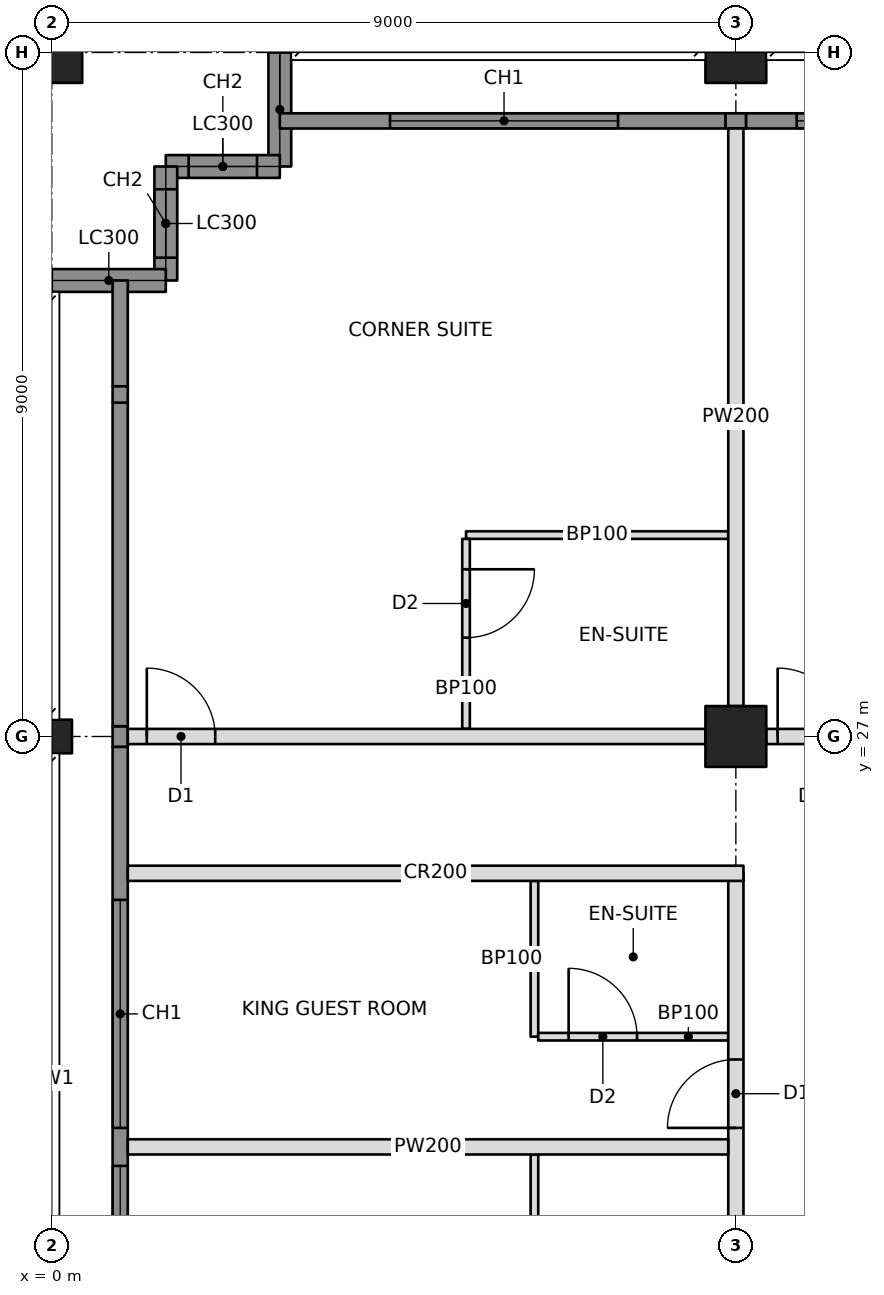
"""IFC4 building model, lengths in metres.
Left out: names, types, materials, properties, quantities, classifications, styles, units other than length and angle.
Written with IfcOpenShell. Run it as: python <this file> out.ifc"""

import sys

from ifc_helpers import new_model, si_unit, direction, frame, frame_2d, origin, origin_2d, place, context, subcontext, project, spatial, rectangle, hollow_rectangle, i_section, extrude, element, fill, save


model = new_model("IFC4")
c1 = context("Model", 3, precision=1e-05, world=origin(), true_north=direction((0.0, 1.0)))
c2 = subcontext(c1, "Body", "Model", "MODEL_VIEW")
j1 = project(units=[si_unit("LENGTHUNIT", "METRE"), si_unit("PLANEANGLEUNIT", "RADIAN")], contexts=[c1])
p1 = place(None, origin())
s1 = spatial("IfcSite", under=j1, at=p1, CompositionType="ELEMENT")
p2 = place(p1, origin())
s2 = spatial("IfcBuilding", under=s1, at=p2, CompositionType="ELEMENT")
p3 = place(p2, frame((0.0, 0.0, 124.8)))
s3 = spatial("IfcBuildingStorey", under=s2, at=p3, CompositionType="ELEMENT", Elevation=124.8)
p4 = place(p3, frame((0.0, 27.0, 0.0), z_axis=(0.0, 0.0, 1.0), x_axis=(0.0, 1.0, 0.0)))
e1 = element("IfcColumn", 1, at=p4, inside=s3, PredefinedType="COLUMN", context=c2, shape_type="SweptSolid", body=[
    extrude(i_section(OverallWidth=0.442, OverallDepth=0.531, WebThickness=0.066, FlangeThickness=0.106, at=origin_2d()), origin(), (0.0, 0.0, 1.0), 3.4),
])
p5 = place(p3, frame((0.0, 36.0, 0.0), z_axis=(0.0, 0.0, 1.0), x_axis=(1.0, 0.0, 0.0)))
e2 = element("IfcColumn", 2, at=p5, inside=s3, PredefinedType="COLUMN", context=c2, shape_type="SweptSolid", body=[
    extrude(hollow_rectangle(XDim=0.8, YDim=0.8, WallThickness=0.06, at=origin_2d()), origin(), (0.0, 0.0, 1.0), 3.4),
])
p6 = place(p3, frame((9.0, 27.0, 0.0), z_axis=(0.0, 0.0, 1.0), x_axis=(1.0, 0.0, 0.0)))
e3 = element("IfcColumn", 3, at=p6, inside=s3, PredefinedType="COLUMN", context=c2, shape_type="SweptSolid", body=[
    extrude(hollow_rectangle(XDim=0.8, YDim=0.8, WallThickness=0.07, at=origin_2d()), origin(), (0.0, 0.0, 1.0), 3.4),
])
p7 = place(p3, frame((9.0, 36.0, 0.0), z_axis=(0.0, 0.0, 1.0), x_axis=(1.0, 0.0, 0.0)))
e4 = element("IfcColumn", 4, at=p7, inside=s3, PredefinedType="COLUMN", context=c2, shape_type="SweptSolid", body=[
    extrude(hollow_rectangle(XDim=0.8, YDim=0.8, WallThickness=0.06, at=origin_2d()), origin(), (0.0, 0.0, 1.0), 3.4),
])
p8 = place(p3, frame((3.0, 36.0, 0.0), z_axis=(0.0, 0.0, 1.0), x_axis=(0.0, -1.0, 0.0)))
e5 = element("IfcWall", 5, at=p8, inside=s3, PredefinedType="SOLIDWALL", context=c2, shape_type="SweptSolid", body=[
    extrude(rectangle(XDim=1.5, YDim=0.3, at=frame_2d((0.75, 0.0))), origin(), (0.0, 0.0, 1.0), 2.42),
])
p9 = place(p3, frame((3.0, 34.5, 0.0), z_axis=(0.0, 0.0, 1.0), x_axis=(-1.0, 0.0, 0.0)))
e6 = element("IfcWall", 6, at=p9, inside=s3, PredefinedType="SOLIDWALL", context=c2, shape_type="SweptSolid", body=[
    extrude(rectangle(XDim=1.5, YDim=0.3, at=frame_2d((0.75, 0.0))), origin(), (0.0, 0.0, 1.0), 3.2),
])
p10 = place(p9, frame((0.3, 0.0, 0.6)))
e7 = element("IfcOpeningElement", 7, at=p10, cuts=e6, PredefinedType="OPENING", context=c2, shape_type="SweptSolid", body=[
    extrude(rectangle(XDim=0.9, YDim=2.2, at=frame_2d((0.45, 1.1))), frame((0.0, 0.16, 0.0), z_axis=(0.0, -1.0, 0.0), x_axis=(1.0, 0.0, 0.0)), (0.0, 0.0, 1.0), 0.32),
])
p11 = place(p3, frame((1.5, 34.5, 0.0), z_axis=(0.0, 0.0, 1.0), x_axis=(0.0, -1.0, 0.0)))
e8 = element("IfcWall", 8, at=p11, inside=s3, PredefinedType="SOLIDWALL", context=c2, shape_type="SweptSolid", body=[
    extrude(rectangle(XDim=1.5, YDim=0.3, at=frame_2d((0.75, 0.0))), origin(), (0.0, 0.0, 1.0), 3.2),
])
p12 = place(p11, frame((0.3, 0.0, 0.6)))
e9 = element("IfcOpeningElement", 9, at=p12, cuts=e8, PredefinedType="OPENING", context=c2, shape_type="SweptSolid", body=[
    extrude(rectangle(XDim=0.9, YDim=2.2, at=frame_2d((0.45, 1.1))), frame((0.0, 0.16, 0.0), z_axis=(0.0, -1.0, 0.0), x_axis=(1.0, 0.0, 0.0)), (0.0, 0.0, 1.0), 0.32),
])
p13 = place(p3, frame((1.5, 33.0, 0.0), z_axis=(0.0, 0.0, 1.0), x_axis=(-1.0, 0.0, 0.0)))
e10 = element("IfcWall", 10, at=p13, inside=s3, PredefinedType="SOLIDWALL", context=c2, shape_type="SweptSolid", body=[
    extrude(rectangle(XDim=1.5, YDim=0.3, at=frame_2d((0.75, 0.0))), origin(), (0.0, 0.0, 1.0), 2.42),
])
p14 = place(p3, frame((3.0, 35.1, 0.0), z_axis=(0.0, 0.0, 1.0), x_axis=(1.0, 0.0, 0.0)))
e11 = element("IfcWall", 11, at=p14, inside=s3, PredefinedType="SOLIDWALL", context=c2, shape_type="SweptSolid", body=[
    extrude(rectangle(XDim=5.865, YDim=0.2, at=frame_2d((2.932, 0.0))), origin(), (0.0, 0.0, 1.0), 3.2),
])
p15 = place(p14, frame((1.45, 0.0, 0.6)))
e12 = element("IfcOpeningElement", 12, at=p15, cuts=e11, PredefinedType="OPENING", context=c2, shape_type="SweptSolid", body=[
    extrude(rectangle(XDim=3.0, YDim=2.2, at=frame_2d((1.5, 1.1))), frame((0.0, 0.11, 0.0), z_axis=(0.0, -1.0, 0.0), x_axis=(1.0, 0.0, 0.0)), (0.0, 0.0, 1.0), 0.22),
])
p16 = place(p3, frame((1.0, 27.0, 0.0), z_axis=(0.0, 0.0, 1.0), x_axis=(1.0, 0.0, 0.0)))
e13 = element("IfcWall", 13, at=p16, inside=s3, PredefinedType="PARTITIONING", context=c2, shape_type="SweptSolid", body=[
    extrude(rectangle(XDim=7.6, YDim=0.2, at=frame_2d((3.8, 0.0))), origin(), (0.0, 0.0, 1.0), 2.438),
])
p17 = place(p16, frame((0.25, 0.0, 0.0)))
e14 = element("IfcOpeningElement", 14, at=p17, cuts=e13, PredefinedType="OPENING", context=c2, shape_type="SweptSolid", body=[
    extrude(rectangle(XDim=0.9, YDim=2.1, at=frame_2d((0.45, 1.05))), frame((0.0, 0.11, 0.0), z_axis=(0.0, -1.0, 0.0), x_axis=(1.0, 0.0, 0.0)), (0.0, 0.0, 1.0), 0.22),
])
p18 = place(p3, frame((9.4, 27.0, 0.0), z_axis=(0.0, 0.0, 1.0), x_axis=(1.0, 0.0, 0.0)))
e15 = element("IfcWall", 15, at=p18, inside=s3, PredefinedType="PARTITIONING", context=c2, shape_type="SweptSolid", body=[
    extrude(rectangle(XDim=8.2, YDim=0.2, at=frame_2d((4.1, 0.0))), origin(), (0.0, 0.0, 1.0), 2.405),
])
p19 = place(p18, frame((0.15, 0.0, 0.0)))
e16 = element("IfcOpeningElement", 16, at=p19, cuts=e15, PredefinedType="OPENING", context=c2, shape_type="SweptSolid", body=[
    extrude(rectangle(XDim=0.9, YDim=2.1, at=frame_2d((0.45, 1.05))), frame((0.0, 0.11, 0.0), z_axis=(0.0, -1.0, 0.0), x_axis=(1.0, 0.0, 0.0)), (0.0, 0.0, 1.0), 0.22),
])
p20 = place(p3, frame((9.0, 18.4, 0.0), z_axis=(0.0, 0.0, 1.0), x_axis=(0.0, 1.0, 0.0)))
e17 = element("IfcWall", 17, at=p20, inside=s3, PredefinedType="PARTITIONING", context=c2, shape_type="SweptSolid", body=[
    extrude(rectangle(XDim=6.8, YDim=0.2, at=frame_2d((3.4, 0.0))), origin(), (0.0, 0.0, 1.0), 2.405),
])
p21 = place(p20, frame((3.45, 0.0, 0.0)))
e18 = element("IfcOpeningElement", 18, at=p21, cuts=e17, PredefinedType="OPENING", context=c2, shape_type="SweptSolid", body=[
    extrude(rectangle(XDim=0.9, YDim=2.1, at=frame_2d((0.45, 1.05))), frame((0.0, 0.11, 0.0), z_axis=(0.0, -1.0, 0.0), x_axis=(1.0, 0.0, 0.0)), (0.0, 0.0, 1.0), 0.22),
])
p22 = place(p3, frame((1.0, 25.2, 0.0), z_axis=(0.0, 0.0, 1.0), x_axis=(1.0, 0.0, 0.0)))
e19 = element("IfcWall", 19, at=p22, inside=s3, PredefinedType="PARTITIONING", context=c2, shape_type="SweptSolid", body=[
    extrude(rectangle(XDim=8.1, YDim=0.2, at=frame_2d((4.05, 0.0))), origin(), (0.0, 0.0, 1.0), 2.404),
])
p23 = place(p3, frame((9.0, 27.4, 0.0), z_axis=(0.0, 0.0, 1.0), x_axis=(0.0, 1.0, 0.0)))
e20 = element("IfcWall", 20, at=p23, inside=s3, PredefinedType="PARTITIONING", context=c2, shape_type="SweptSolid", body=[
    extrude(rectangle(XDim=7.6, YDim=0.2, at=frame_2d((3.8, 0.0))), origin(), (0.0, 0.0, 1.0), 2.438),
])
p24 = place(p3, frame((5.45, 29.65, 0.0), z_axis=(0.0, 0.0, 1.0), x_axis=(1.0, 0.0, 0.0)))
e21 = element("IfcWall", 21, at=p24, inside=s3, PredefinedType="PARTITIONING", context=c2, shape_type="SweptSolid", body=[
    extrude(rectangle(XDim=3.45, YDim=0.1, at=frame_2d((1.725, 0.0))), origin(), (0.0, 0.0, 1.0), 2.438),
])
p25 = place(p3, frame((5.45, 27.1, 0.0), z_axis=(0.0, 0.0, 1.0), x_axis=(0.0, 1.0, 0.0)))
e22 = element("IfcWall", 22, at=p25, inside=s3, PredefinedType="PARTITIONING", context=c2, shape_type="SweptSolid", body=[
    extrude(rectangle(XDim=2.5, YDim=0.1, at=frame_2d((1.25, 0.0))), origin(), (0.0, 0.0, 1.0), 2.438),
])
p26 = place(p25, frame((1.2, 0.0, 0.0)))
e23 = element("IfcOpeningElement", 23, at=p26, cuts=e22, PredefinedType="OPENING", context=c2, shape_type="SweptSolid", body=[
    extrude(rectangle(XDim=0.9, YDim=2.1, at=frame_2d((0.45, 1.05))), frame((0.0, 0.06, 0.0), z_axis=(0.0, -1.0, 0.0), x_axis=(1.0, 0.0, 0.0)), (0.0, 0.0, 1.0), 0.12),
])
p27 = place(p3, frame((8.9, 21.6, 0.0), z_axis=(0.0, 0.0, 1.0), x_axis=(-1.0, 0.0, 0.0)))
e24 = element("IfcWall", 24, at=p27, inside=s3, PredefinedType="PARTITIONING", context=c2, shape_type="SweptSolid", body=[
    extrude(rectangle(XDim=7.9, YDim=0.2, at=frame_2d((3.95, 0.0))), origin(), (0.0, 0.0, 1.0), 2.404),
])
p28 = place(p3, frame((6.35, 18.05, 0.0), z_axis=(0.0, 0.0, 1.0), x_axis=(0.0, 1.0, 0.0)))
e25 = element("IfcWall", 25, at=p28, inside=s3, PredefinedType="PARTITIONING", context=c2, shape_type="SweptSolid", body=[
    extrude(rectangle(XDim=3.45, YDim=0.1, at=frame_2d((1.725, 0.0))), origin(), (0.0, 0.0, 1.0), 2.404),
])
p29 = place(p3, frame((6.35, 23.05, 0.0), z_axis=(0.0, 0.0, 1.0), x_axis=(0.0, 1.0, 0.0)))
e26 = element("IfcWall", 26, at=p29, inside=s3, PredefinedType="PARTITIONING", context=c2, shape_type="SweptSolid", body=[
    extrude(rectangle(XDim=2.05, YDim=0.1, at=frame_2d((1.025, 0.0))), origin(), (0.0, 0.0, 1.0), 3.2),
])
p30 = place(p3, frame((8.9, 23.05, 0.0), z_axis=(0.0, 0.0, 1.0), x_axis=(-1.0, 0.0, 0.0)))
e27 = element("IfcWall", 27, at=p30, inside=s3, PredefinedType="PARTITIONING", context=c2, shape_type="SweptSolid", body=[
    extrude(rectangle(XDim=2.5, YDim=0.1, at=frame_2d((1.25, 0.0))), origin(), (0.0, 0.0, 1.0), 2.404),
])
p31 = place(p30, frame((1.2, 0.0, 0.0)))
e28 = element("IfcOpeningElement", 28, at=p31, cuts=e27, PredefinedType="OPENING", context=c2, shape_type="SweptSolid", body=[
    extrude(rectangle(XDim=0.9, YDim=2.1, at=frame_2d((0.45, 1.05))), frame((0.0, 0.06, 0.0), z_axis=(0.0, -1.0, 0.0), x_axis=(1.0, 0.0, 0.0)), (0.0, 0.0, 1.0), 0.12),
])
p32 = place(p3, frame((0.9, 18.194, 0.0), z_axis=(0.0, 0.0, 1.0), x_axis=(0.0, 1.0, 0.0)))
e29 = element("IfcWall", 29, at=p32, inside=s3, PredefinedType="SOLIDWALL", context=c2, shape_type="SweptSolid", body=[
    extrude(rectangle(XDim=8.671, YDim=0.2, at=frame_2d((4.335, 0.0))), origin(), (0.0, 0.0, 1.0), 3.2),
])
p33 = place(p32, frame((0.156, 0.0, 0.6)))
e30 = element("IfcOpeningElement", 30, at=p33, cuts=e29, PredefinedType="OPENING", context=c2, shape_type="SweptSolid", body=[
    extrude(rectangle(XDim=3.0, YDim=2.2, at=frame_2d((1.5, 1.1))), frame((0.0, 0.11, 0.0), z_axis=(0.0, -1.0, 0.0), x_axis=(1.0, 0.0, 0.0)), (0.0, 0.0, 1.0), 0.22),
])
p34 = place(p32, frame((3.656, 0.0, 0.6)))
e31 = element("IfcOpeningElement", 31, at=p34, cuts=e29, PredefinedType="OPENING", context=c2, shape_type="SweptSolid", body=[
    extrude(rectangle(XDim=3.0, YDim=2.2, at=frame_2d((1.5, 1.1))), frame((0.0, 0.11, 0.0), z_axis=(0.0, -1.0, 0.0), x_axis=(1.0, 0.0, 0.0)), (0.0, 0.0, 1.0), 0.22),
])
p35 = place(p3, frame((0.9, 26.865, 0.0), z_axis=(0.0, 0.0, 1.0), x_axis=(0.0, 1.0, 0.0)))
e32 = element("IfcWall", 32, at=p35, inside=s3, PredefinedType="SOLIDWALL", context=c2, shape_type="SweptSolid", body=[
    extrude(rectangle(XDim=0.271, YDim=0.2, at=frame_2d((0.135, 0.0))), origin(), (0.0, 0.0, 1.0), 2.438),
])
p36 = place(p3, frame((0.9, 27.135, 0.0), z_axis=(0.0, 0.0, 1.0), x_axis=(0.0, 1.0, 0.0)))
e33 = element("IfcWall", 33, at=p36, inside=s3, PredefinedType="SOLIDWALL", context=c2, shape_type="SweptSolid", body=[
    extrude(rectangle(XDim=4.257, YDim=0.2, at=frame_2d((2.129, 0.0))), origin(), (0.0, 0.0, 1.0), 3.2),
])
p37 = place(p3, frame((0.9, 31.393, 0.0), z_axis=(0.0, 0.0, 1.0), x_axis=(0.0, 1.0, 0.0)))
e34 = element("IfcWall", 34, at=p37, inside=s3, PredefinedType="SOLIDWALL", context=c2, shape_type="SweptSolid", body=[
    extrude(rectangle(XDim=0.215, YDim=0.2, at=frame_2d((0.107, 0.0))), origin(), (0.0, 0.0, 1.0), 2.661),
])
p38 = place(p3, frame((0.9, 31.607, 0.0), z_axis=(0.0, 0.0, 1.0), x_axis=(0.0, 1.0, 0.0)))
e35 = element("IfcWall", 35, at=p38, inside=s3, PredefinedType="SOLIDWALL", context=c2, shape_type="SweptSolid", body=[
    extrude(rectangle(XDim=1.393, YDim=0.2, at=frame_2d((0.696, 0.0))), origin(), (0.0, 0.0, 1.0), 3.2),
])
p39 = place(p3, frame((8.865, 35.1, 0.0), z_axis=(0.0, 0.0, 1.0), x_axis=(1.0, 0.0, 0.0)))
e36 = element("IfcWall", 36, at=p39, inside=s3, PredefinedType="SOLIDWALL", context=c2, shape_type="SweptSolid", body=[
    extrude(rectangle(XDim=0.271, YDim=0.2, at=frame_2d((0.135, 0.0))), origin(), (0.0, 0.0, 1.0), 2.438),
])
p40 = place(p3, frame((9.135, 35.1, 0.0), z_axis=(0.0, 0.0, 1.0), x_axis=(1.0, 0.0, 0.0)))
e37 = element("IfcWall", 37, at=p40, inside=s3, PredefinedType="SOLIDWALL", context=c2, shape_type="SweptSolid", body=[
    extrude(rectangle(XDim=8.671, YDim=0.2, at=frame_2d((4.335, 0.0))), origin(), (0.0, 0.0, 1.0), 3.2),
])
p41 = place(p40, frame((0.665, 0.0, 0.6)))
e38 = element("IfcOpeningElement", 38, at=p41, cuts=e37, PredefinedType="OPENING", context=c2, shape_type="SweptSolid", body=[
    extrude(rectangle(XDim=3.0, YDim=2.2, at=frame_2d((1.5, 1.1))), frame((0.0, 0.11, 0.0), z_axis=(0.0, -1.0, 0.0), x_axis=(1.0, 0.0, 0.0)), (0.0, 0.0, 1.0), 0.22),
])
p42 = place(p40, frame((5.065, 0.0, 0.6)))
e39 = element("IfcOpeningElement", 39, at=p42, cuts=e37, PredefinedType="OPENING", context=c2, shape_type="SweptSolid", body=[
    extrude(rectangle(XDim=3.0, YDim=2.2, at=frame_2d((1.5, 1.1))), frame((0.0, 0.11, 0.0), z_axis=(0.0, -1.0, 0.0), x_axis=(1.0, 0.0, 0.0)), (0.0, 0.0, 1.0), 0.22),
])
p43 = place(p10, origin())
e40 = element("IfcWindow", 40, at=p43, inside=s3, PartitioningType="SINGLE_PANEL", PredefinedType="WINDOW", context=c2, shape_type="SweptSolid", body=[
    extrude(rectangle(XDim=0.9, YDim=2.2, at=frame_2d((0.45, 1.1))), frame((0.0, 0.03, 0.0), z_axis=(0.0, -1.0, 0.0), x_axis=(1.0, 0.0, 0.0)), (0.0, 0.0, 1.0), 0.06),
])
fill(e7, e40)
p44 = place(p12, origin())
e41 = element("IfcWindow", 41, at=p44, inside=s3, PartitioningType="SINGLE_PANEL", PredefinedType="WINDOW", context=c2, shape_type="SweptSolid", body=[
    extrude(rectangle(XDim=0.9, YDim=2.2, at=frame_2d((0.45, 1.1))), frame((0.0, 0.03, 0.0), z_axis=(0.0, -1.0, 0.0), x_axis=(1.0, 0.0, 0.0)), (0.0, 0.0, 1.0), 0.06),
])
fill(e9, e41)
p45 = place(p15, origin())
e42 = element("IfcWindow", 42, at=p45, inside=s3, PartitioningType="TRIPLE_PANEL_VERTICAL", PredefinedType="WINDOW", context=c2, shape_type="SweptSolid", body=[
    extrude(rectangle(XDim=3.0, YDim=2.2, at=frame_2d((1.5, 1.1))), frame((0.0, 0.03, 0.0), z_axis=(0.0, -1.0, 0.0), x_axis=(1.0, 0.0, 0.0)), (0.0, 0.0, 1.0), 0.06),
])
fill(e12, e42)
p46 = place(p41, origin())
e43 = element("IfcWindow", 43, at=p46, inside=s3, PartitioningType="TRIPLE_PANEL_VERTICAL", PredefinedType="WINDOW", context=c2, shape_type="SweptSolid", body=[
    extrude(rectangle(XDim=3.0, YDim=2.2, at=frame_2d((1.5, 1.1))), frame((0.0, 0.03, 0.0), z_axis=(0.0, -1.0, 0.0), x_axis=(1.0, 0.0, 0.0)), (0.0, 0.0, 1.0), 0.06),
])
fill(e38, e43)
p47 = place(p33, origin())
e44 = element("IfcWindow", 44, at=p47, inside=s3, PartitioningType="TRIPLE_PANEL_VERTICAL", PredefinedType="WINDOW", context=c2, shape_type="SweptSolid", body=[
    extrude(rectangle(XDim=3.0, YDim=2.2, at=frame_2d((1.5, 1.1))), frame((0.0, 0.03, 0.0), z_axis=(0.0, -1.0, 0.0), x_axis=(1.0, 0.0, 0.0)), (0.0, 0.0, 1.0), 0.06),
])
fill(e30, e44)
p48 = place(p34, origin())
e45 = element("IfcWindow", 45, at=p48, inside=s3, PartitioningType="TRIPLE_PANEL_VERTICAL", PredefinedType="WINDOW", context=c2, shape_type="SweptSolid", body=[
    extrude(rectangle(XDim=3.0, YDim=2.2, at=frame_2d((1.5, 1.1))), frame((0.0, 0.03, 0.0), z_axis=(0.0, -1.0, 0.0), x_axis=(1.0, 0.0, 0.0)), (0.0, 0.0, 1.0), 0.06),
])
fill(e31, e45)
p49 = place(p26, frame((0.9, 0.0, 0.0), z_axis=(0.0, 0.0, 1.0), x_axis=(-1.0, 0.0, 0.0)))
e46 = element("IfcDoor", 46, at=p49, inside=s3, OperationType="SINGLE_SWING_LEFT", PredefinedType="DOOR", context=c2, shape_type="SweptSolid", body=[
    extrude(rectangle(XDim=0.9, YDim=2.1, at=frame_2d((0.45, 1.05))), frame((0.0, 0.025, 0.0), z_axis=(0.0, -1.0, 0.0), x_axis=(1.0, 0.0, 0.0)), (0.0, 0.0, 1.0), 0.05),
])
fill(e23, e46)
p50 = place(p17, origin())
e47 = element("IfcDoor", 47, at=p50, inside=s3, OperationType="SINGLE_SWING_LEFT", PredefinedType="DOOR", context=c2, shape_type="SweptSolid", body=[
    extrude(rectangle(XDim=0.9, YDim=2.1, at=frame_2d((0.45, 1.05))), frame((0.0, 0.025, 0.0), z_axis=(0.0, -1.0, 0.0), x_axis=(1.0, 0.0, 0.0)), (0.0, 0.0, 1.0), 0.05),
])
fill(e14, e47)
p51 = place(p19, origin())
e48 = element("IfcDoor", 48, at=p51, inside=s3, OperationType="SINGLE_SWING_LEFT", PredefinedType="DOOR", context=c2, shape_type="SweptSolid", body=[
    extrude(rectangle(XDim=0.9, YDim=2.1, at=frame_2d((0.45, 1.05))), frame((0.0, 0.025, 0.0), z_axis=(0.0, -1.0, 0.0), x_axis=(1.0, 0.0, 0.0)), (0.0, 0.0, 1.0), 0.05),
])
fill(e16, e48)
p52 = place(p31, frame((0.9, 0.0, 0.0), z_axis=(0.0, 0.0, 1.0), x_axis=(-1.0, 0.0, 0.0)))
e49 = element("IfcDoor", 49, at=p52, inside=s3, OperationType="SINGLE_SWING_LEFT", PredefinedType="DOOR", context=c2, shape_type="SweptSolid", body=[
    extrude(rectangle(XDim=0.9, YDim=2.1, at=frame_2d((0.45, 1.05))), frame((0.0, 0.025, 0.0), z_axis=(0.0, -1.0, 0.0), x_axis=(1.0, 0.0, 0.0)), (0.0, 0.0, 1.0), 0.05),
])
fill(e28, e49)
p53 = place(p21, origin())
e50 = element("IfcDoor", 50, at=p53, inside=s3, OperationType="SINGLE_SWING_LEFT", PredefinedType="DOOR", context=c2, shape_type="SweptSolid", body=[
    extrude(rectangle(XDim=0.9, YDim=2.1, at=frame_2d((0.45, 1.05))), frame((0.0, 0.025, 0.0), z_axis=(0.0, -1.0, 0.0), x_axis=(1.0, 0.0, 0.0)), (0.0, 0.0, 1.0), 0.05),
])
fill(e18, e50)
save(model, sys.argv[1])
